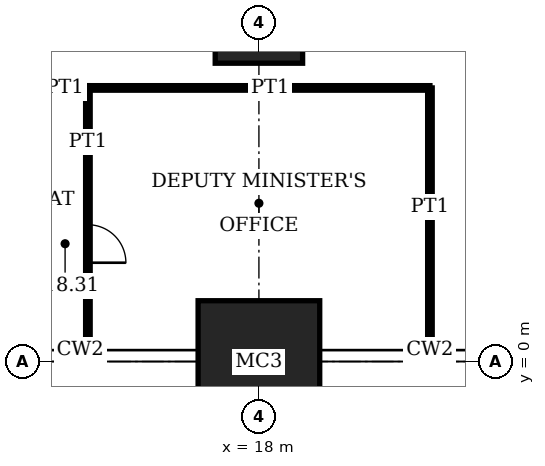
"""IFC4 building model, lengths in metres.
Left out: names, types, materials, properties, quantities, classifications, styles, units other than length and angle.
Written with IfcOpenShell. Run it as: python <this file> out.ifc"""

import sys

from ifc_helpers import new_model, si_unit, direction, frame, frame_2d, origin, origin_2d, place, context, subcontext, project, spatial, rectangle, extrude, element, fill, save


model = new_model("IFC4")
c1 = context("Model", 3, precision=1e-05, world=origin(), true_north=direction((0.0, 1.0)))
c2 = subcontext(c1, "Body", "Model", "MODEL_VIEW")
j1 = project(units=[si_unit("LENGTHUNIT", "METRE"), si_unit("PLANEANGLEUNIT", "RADIAN")], contexts=[c1])
p1 = place(None, origin())
s1 = spatial("IfcSite", under=j1, at=p1, CompositionType="ELEMENT")
p2 = place(p1, origin())
s2 = spatial("IfcBuilding", under=s1, at=p2, CompositionType="ELEMENT")
p3 = place(p2, frame((0.0, 0.0, 75.8)))
s3 = spatial("IfcBuildingStorey", under=s2, at=p3, CompositionType="ELEMENT", Elevation=75.8)
p4 = place(p3, frame((18.0, 0.0, 0.0), z_axis=(0.0, 0.0, 1.0), x_axis=(1.0, 0.0, 0.0)))
e1 = element("IfcColumn", 1, at=p4, inside=s3, PredefinedType="COLUMN", context=c2, shape_type="SweptSolid", body=[
    extrude(rectangle(XDim=3.2, YDim=3.2, at=origin_2d()), origin(), (0.0, 0.0, 1.0), 4.2),
])
p5 = place(p3, frame((18.0, 9.0, 0.0), z_axis=(0.0, 0.0, 1.0), x_axis=(1.0, 0.0, 0.0)))
e2 = element("IfcColumn", 2, at=p5, inside=s3, PredefinedType="COLUMN", context=c2, shape_type="SweptSolid", body=[
    extrude(rectangle(XDim=2.3, YDim=2.3, at=origin_2d()), origin(), (0.0, 0.0, 1.0), 4.2),
])
p6 = place(p3, frame((9.0, 7.2, 0.0), z_axis=(0.0, 0.0, 1.0), x_axis=(1.0, 0.0, 0.0)))
e3 = element("IfcWall", 3, at=p6, inside=s3, PredefinedType="PARTITIONING", context=c2, shape_type="SweptSolid", body=[
    extrude(rectangle(XDim=4.5, YDim=0.12, at=frame_2d((2.25, 0.0))), origin(), (0.0, 0.0, 1.0), 3.85),
])
p7 = place(p6, frame((1.75, 0.0, 0.0)))
e4 = element("IfcOpeningElement", 4, at=p7, cuts=e3, PredefinedType="OPENING", context=c2, shape_type="SweptSolid", body=[
    extrude(rectangle(XDim=1.0, YDim=2.4, at=frame_2d((0.5, 1.2))), frame((0.0, 0.07, 0.0), z_axis=(0.0, -1.0, 0.0), x_axis=(1.0, 0.0, 0.0)), (0.0, 0.0, 1.0), 0.14),
])
p8 = place(p3, frame((13.5, 7.2, 0.0), z_axis=(0.0, 0.0, 1.0), x_axis=(1.0, 0.0, 0.0)))
e5 = element("IfcWall", 5, at=p8, inside=s3, PredefinedType="PARTITIONING", context=c2, shape_type="SweptSolid", body=[
    extrude(rectangle(XDim=9.0, YDim=0.12, at=frame_2d((4.5, 0.0))), origin(), (0.0, 0.0, 1.0), 3.85),
])
p9 = place(p3, frame((13.5, 0.31, 0.0), z_axis=(0.0, 0.0, 1.0), x_axis=(0.0, 1.0, 0.0)))
e6 = element("IfcWall", 6, at=p9, inside=s3, PredefinedType="PARTITIONING", context=c2, shape_type="SweptSolid", body=[
    extrude(rectangle(XDim=6.89, YDim=0.12, at=frame_2d((3.445, 0.0))), origin(), (0.0, 0.0, 1.0), 3.85),
])
p10 = place(p9, frame((2.29, 0.0, 0.0)))
e7 = element("IfcOpeningElement", 7, at=p10, cuts=e6, PredefinedType="OPENING", context=c2, shape_type="SweptSolid", body=[
    extrude(rectangle(XDim=1.0, YDim=2.4, at=frame_2d((0.5, 1.2))), frame((0.0, 0.07, 0.0), z_axis=(0.0, -1.0, 0.0), x_axis=(1.0, 0.0, 0.0)), (0.0, 0.0, 1.0), 0.14),
])
p11 = place(p3, frame((22.5, 0.31, 0.0), z_axis=(0.0, 0.0, 1.0), x_axis=(0.0, 1.0, 0.0)))
e8 = element("IfcWall", 8, at=p11, inside=s3, PredefinedType="PARTITIONING", context=c2, shape_type="SweptSolid", body=[
    extrude(rectangle(XDim=6.89, YDim=0.12, at=frame_2d((3.445, 0.0))), origin(), (0.0, 0.0, 1.0), 3.85),
])
p12 = place(p10, origin())
e9 = element("IfcDoor", 9, at=p12, inside=s3, OperationType="SINGLE_SWING_LEFT", PredefinedType="DOOR", context=c2, shape_type="SweptSolid", body=[
    extrude(rectangle(XDim=1.0, YDim=2.4, at=frame_2d((0.5, 1.2))), frame((0.0, 0.025, 0.0), z_axis=(0.0, -1.0, 0.0), x_axis=(1.0, 0.0, 0.0)), (0.0, 0.0, 1.0), 0.05),
])
fill(e7, e9)
save(model, sys.argv[1])
